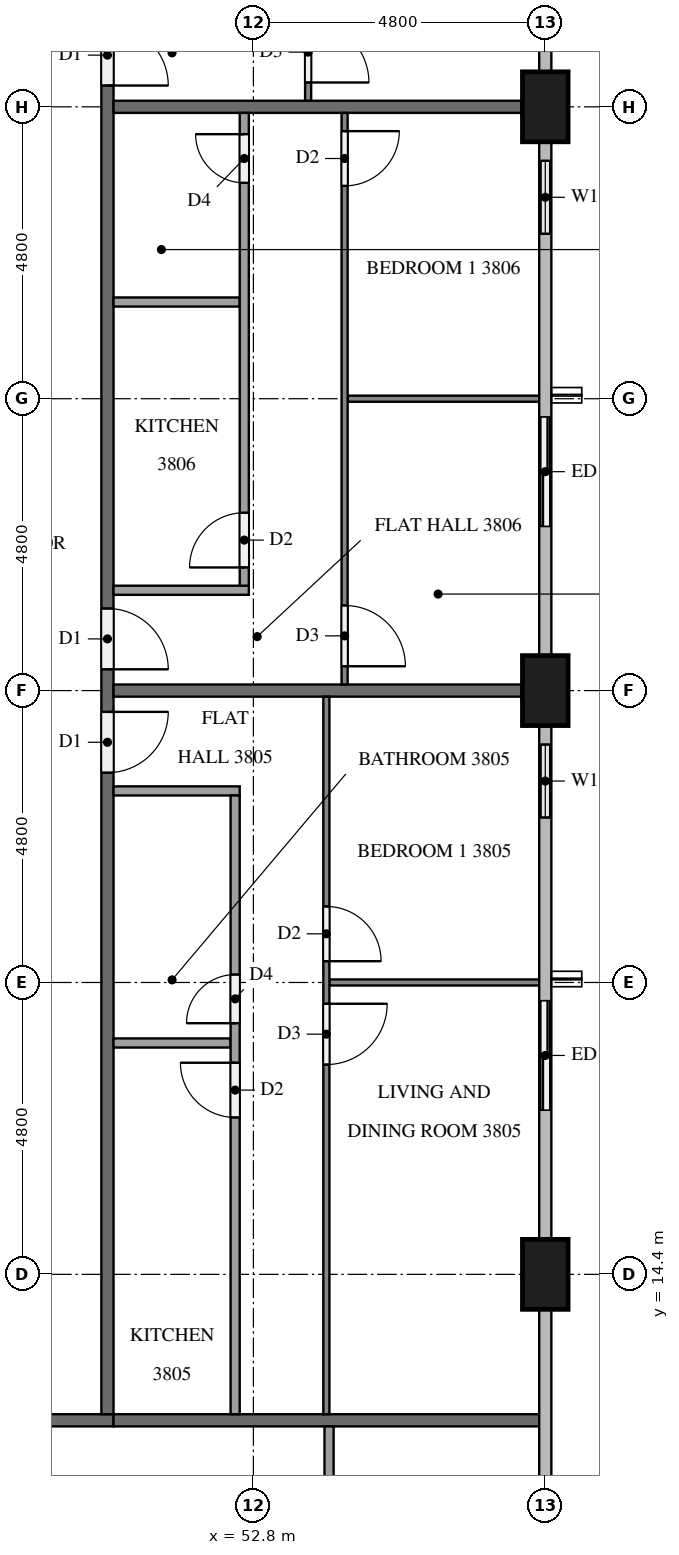
"""IFC4 building model, lengths in metres.
Left out: names, types, materials, properties, quantities, classifications, styles, units other than length and angle.
Written with IfcOpenShell. Run it as: python <this file> out.ifc"""

import sys

from ifc_helpers import new_model, si_unit, direction, frame, frame_2d, origin, origin_2d, place, context, subcontext, project, spatial, rectangle, extrude, element, fill, save


model = new_model("IFC4")
c1 = context("Model", 3, precision=1e-05, world=origin(), true_north=direction((0.0, 1.0)))
c2 = subcontext(c1, "Body", "Model", "MODEL_VIEW")
j1 = project(units=[si_unit("LENGTHUNIT", "METRE"), si_unit("PLANEANGLEUNIT", "RADIAN")], contexts=[c1])
p1 = place(None, origin())
s1 = spatial("IfcSite", under=j1, at=p1, CompositionType="ELEMENT")
p2 = place(p1, origin())
s2 = spatial("IfcBuilding", under=s1, at=p2, CompositionType="ELEMENT")
p3 = place(p2, frame((0.0, 0.0, 149.0)))
s3 = spatial("IfcBuildingStorey", under=s2, at=p3, CompositionType="ELEMENT", Elevation=149.0)
for number, where, z_axis, x_axis in (
    (1, (57.6, 14.4, 0.0), (0.0, 0.0, 1.0), (0.0, 1.0, 0.0)),
    (2, (57.6, 24.0, 0.0), (0.0, 0.0, 1.0), (0.0, 1.0, 0.0)),
    (3, (57.6, 33.6, 0.0), (0.0, 0.0, 1.0), (0.0, 1.0, 0.0)),
):
    element("IfcColumn", number, at=place(p3, frame(where, z_axis=z_axis, x_axis=x_axis)), inside=s3, PredefinedType="COLUMN", context=c2, shape_type="SweptSolid", body=[
        extrude(rectangle(XDim=1.15, YDim=0.75, at=origin_2d()), origin(), (0.0, 0.0, 1.0), 3.2),
    ])
p4 = place(p3, frame((57.6, 16.8, 0.0), z_axis=(0.0, 0.0, 1.0), x_axis=(0.0, 1.0, 0.0)))
e4 = element("IfcWall", 4, at=p4, inside=s3, PredefinedType="SOLIDWALL", context=c2, shape_type="SweptSolid", body=[
    extrude(rectangle(XDim=2.4, YDim=0.15, at=frame_2d((1.2, 0.0))), origin(), (0.0, 0.0, 1.0), 3.2),
])
p5 = place(p4, frame((0.3, 0.0, 0.0)))
e5 = element("IfcOpeningElement", 5, at=p5, cuts=e4, PredefinedType="OPENING", context=c2, shape_type="SweptSolid", body=[
    extrude(rectangle(XDim=1.8, YDim=2.4, at=frame_2d((0.9, 1.2))), frame((0.0, 0.085, 0.0), z_axis=(0.0, -1.0, 0.0), x_axis=(1.0, 0.0, 0.0)), (0.0, 0.0, 1.0), 0.17),
])
p6 = place(p3, frame((57.6, 21.6, 0.0), z_axis=(0.0, 0.0, 1.0), x_axis=(0.0, 1.0, 0.0)))
e6 = element("IfcWall", 6, at=p6, inside=s3, PredefinedType="SOLIDWALL", context=c2, shape_type="SweptSolid", body=[
    extrude(rectangle(XDim=1.825, YDim=0.15, at=frame_2d((0.913, 0.0))), origin(), (0.0, 0.0, 1.0), 3.2),
])
p7 = place(p6, frame((0.312, 0.0, 0.9)))
e7 = element("IfcOpeningElement", 7, at=p7, cuts=e6, PredefinedType="OPENING", context=c2, shape_type="SweptSolid", body=[
    extrude(rectangle(XDim=1.2, YDim=1.4, at=frame_2d((0.6, 0.7))), frame((0.0, 0.085, 0.0), z_axis=(0.0, -1.0, 0.0), x_axis=(1.0, 0.0, 0.0)), (0.0, 0.0, 1.0), 0.17),
])
p8 = place(p3, frame((57.6, 26.4, 0.0), z_axis=(0.0, 0.0, 1.0), x_axis=(0.0, 1.0, 0.0)))
e8 = element("IfcWall", 8, at=p8, inside=s3, PredefinedType="SOLIDWALL", context=c2, shape_type="SweptSolid", body=[
    extrude(rectangle(XDim=2.4, YDim=0.15, at=frame_2d((1.2, 0.0))), origin(), (0.0, 0.0, 1.0), 3.2),
])
p9 = place(p8, frame((0.3, 0.0, 0.0)))
e9 = element("IfcOpeningElement", 9, at=p9, cuts=e8, PredefinedType="OPENING", context=c2, shape_type="SweptSolid", body=[
    extrude(rectangle(XDim=1.8, YDim=2.4, at=frame_2d((0.9, 1.2))), frame((0.0, 0.085, 0.0), z_axis=(0.0, -1.0, 0.0), x_axis=(1.0, 0.0, 0.0)), (0.0, 0.0, 1.0), 0.17),
])
p10 = place(p3, frame((57.6, 31.2, 0.0), z_axis=(0.0, 0.0, 1.0), x_axis=(0.0, 1.0, 0.0)))
e10 = element("IfcWall", 10, at=p10, inside=s3, PredefinedType="SOLIDWALL", context=c2, shape_type="SweptSolid", body=[
    extrude(rectangle(XDim=1.825, YDim=0.15, at=frame_2d((0.913, 0.0))), origin(), (0.0, 0.0, 1.0), 3.2),
])
p11 = place(p10, frame((0.312, 0.0, 0.9)))
e11 = element("IfcOpeningElement", 11, at=p11, cuts=e10, PredefinedType="OPENING", context=c2, shape_type="SweptSolid", body=[
    extrude(rectangle(XDim=1.2, YDim=1.4, at=frame_2d((0.6, 0.7))), frame((0.0, 0.085, 0.0), z_axis=(0.0, -1.0, 0.0), x_axis=(1.0, 0.0, 0.0)), (0.0, 0.0, 1.0), 0.17),
])
p12 = place(p3, frame((50.5, 12.0, 0.0), z_axis=(0.0, 0.0, 1.0), x_axis=(-1.0, 0.0, 0.0)))
e12 = element("IfcWall", 12, at=p12, inside=s3, PredefinedType="PARTITIONING", context=c2, shape_type="SweptSolid", body=[
    extrude(rectangle(XDim=38.6, YDim=0.2, at=frame_2d((19.3, 0.0))), origin(), (0.0, 0.0, 1.0), 3.2),
])
p13 = place(p12, frame((36.45, 0.0, 0.0)))
e13 = element("IfcOpeningElement", 13, at=p13, cuts=e12, PredefinedType="OPENING", context=c2, shape_type="SweptSolid", body=[
    extrude(rectangle(XDim=1.0, YDim=2.1, at=frame_2d((0.5, 1.05))), frame((0.0, 0.11, 0.0), z_axis=(0.0, -1.0, 0.0), x_axis=(1.0, 0.0, 0.0)), (0.0, 0.0, 1.0), 0.22),
])
p14 = place(p12, frame((34.75, 0.0, 0.0)))
e14 = element("IfcOpeningElement", 14, at=p14, cuts=e12, PredefinedType="OPENING", context=c2, shape_type="SweptSolid", body=[
    extrude(rectangle(XDim=1.0, YDim=2.1, at=frame_2d((0.5, 1.05))), frame((0.0, 0.11, 0.0), z_axis=(0.0, -1.0, 0.0), x_axis=(1.0, 0.0, 0.0)), (0.0, 0.0, 1.0), 0.22),
])
p15 = place(p12, frame((10.05, 0.0, 0.0)))
e15 = element("IfcOpeningElement", 15, at=p15, cuts=e12, PredefinedType="OPENING", context=c2, shape_type="SweptSolid", body=[
    extrude(rectangle(XDim=1.0, YDim=2.1, at=frame_2d((0.5, 1.05))), frame((0.0, 0.11, 0.0), z_axis=(0.0, -1.0, 0.0), x_axis=(1.0, 0.0, 0.0)), (0.0, 0.0, 1.0), 0.22),
])
p16 = place(p12, frame((8.35, 0.0, 0.0)))
e16 = element("IfcOpeningElement", 16, at=p16, cuts=e12, PredefinedType="OPENING", context=c2, shape_type="SweptSolid", body=[
    extrude(rectangle(XDim=1.0, YDim=2.1, at=frame_2d((0.5, 1.05))), frame((0.0, 0.11, 0.0), z_axis=(0.0, -1.0, 0.0), x_axis=(1.0, 0.0, 0.0)), (0.0, 0.0, 1.0), 0.22),
])
p17 = place(p3, frame((50.4, 40.7, 0.0), z_axis=(0.0, 0.0, 1.0), x_axis=(0.0, -1.0, 0.0)))
e17 = element("IfcWall", 17, at=p17, inside=s3, PredefinedType="PARTITIONING", context=c2, shape_type="SweptSolid", body=[
    extrude(rectangle(XDim=28.6, YDim=0.2, at=frame_2d((14.3, 0.0))), origin(), (0.0, 0.0, 1.0), 3.2),
])
p18 = place(p17, frame((17.05, 0.0, 0.0)))
e18 = element("IfcOpeningElement", 18, at=p18, cuts=e17, PredefinedType="OPENING", context=c2, shape_type="SweptSolid", body=[
    extrude(rectangle(XDim=1.0, YDim=2.1, at=frame_2d((0.5, 1.05))), frame((0.0, 0.11, 0.0), z_axis=(0.0, -1.0, 0.0), x_axis=(1.0, 0.0, 0.0)), (0.0, 0.0, 1.0), 0.22),
])
p19 = place(p17, frame((15.35, 0.0, 0.0)))
e19 = element("IfcOpeningElement", 19, at=p19, cuts=e17, PredefinedType="OPENING", context=c2, shape_type="SweptSolid", body=[
    extrude(rectangle(XDim=1.0, YDim=2.1, at=frame_2d((0.5, 1.05))), frame((0.0, 0.11, 0.0), z_axis=(0.0, -1.0, 0.0), x_axis=(1.0, 0.0, 0.0)), (0.0, 0.0, 1.0), 0.22),
])
p20 = place(p17, frame((5.75, 0.0, 0.0)))
e20 = element("IfcOpeningElement", 20, at=p20, cuts=e17, PredefinedType="OPENING", context=c2, shape_type="SweptSolid", body=[
    extrude(rectangle(XDim=1.0, YDim=2.1, at=frame_2d((0.5, 1.05))), frame((0.0, 0.11, 0.0), z_axis=(0.0, -1.0, 0.0), x_axis=(1.0, 0.0, 0.0)), (0.0, 0.0, 1.0), 0.22),
])
p21 = place(p3, frame((50.5, 12.0, 0.0), z_axis=(0.0, 0.0, 1.0), x_axis=(1.0, 0.0, 0.0)))
e21 = element("IfcWall", 21, at=p21, inside=s3, PredefinedType="PARTITIONING", context=c2, shape_type="SweptSolid", body=[
    extrude(rectangle(XDim=7.0, YDim=0.2, at=frame_2d((3.5, 0.0))), origin(), (0.0, 0.0, 1.0), 3.2),
])
for number, where, z_axis, x_axis in (
    (22, (50.5, 24.0, 0.0), (0.0, 0.0, 1.0), (1.0, 0.0, 0.0)),
    (23, (50.5, 33.6, 0.0), (0.0, 0.0, 1.0), (1.0, 0.0, 0.0)),
):
    element("IfcWall", number, at=place(p3, frame(where, z_axis=z_axis, x_axis=x_axis)), inside=s3, PredefinedType="PARTITIONING", context=c2, shape_type="SweptSolid", body=[
        extrude(rectangle(XDim=6.725, YDim=0.2, at=frame_2d((3.363, 0.0))), origin(), (0.0, 0.0, 1.0), 3.2),
    ])
p22 = place(p3, frame((54.044, 11.9, 0.0), z_axis=(0.0, 0.0, 1.0), x_axis=(0.0, -1.0, 0.0)))
e24 = element("IfcWall", 24, at=p22, inside=s3, PredefinedType="PARTITIONING", context=c2, shape_type="SweptSolid", body=[
    extrude(rectangle(XDim=4.175, YDim=0.15, at=frame_2d((2.087, 0.0))), origin(), (0.0, 0.0, 1.0), 3.2),
])
p23 = place(p3, frame((54.05, 19.2, 0.0), z_axis=(0.0, 0.0, 1.0), x_axis=(1.0, 0.0, 0.0)))
e25 = element("IfcWall", 25, at=p23, inside=s3, PredefinedType="PARTITIONING", context=c2, shape_type="SweptSolid", body=[
    extrude(rectangle(XDim=3.45, YDim=0.1, at=frame_2d((1.725, 0.0))), origin(), (0.0, 0.0, 1.0), 3.2),
])
p24 = place(p3, frame((54.0, 23.9, 0.0), z_axis=(0.0, 0.0, 1.0), x_axis=(0.0, -1.0, 0.0)))
e26 = element("IfcWall", 26, at=p24, inside=s3, PredefinedType="PARTITIONING", context=c2, shape_type="SweptSolid", body=[
    extrude(rectangle(XDim=11.8, YDim=0.1, at=frame_2d((5.9, 0.0))), origin(), (0.0, 0.0, 1.0), 3.2),
])
p25 = place(p24, frame((3.45, 0.0, 0.0)))
e27 = element("IfcOpeningElement", 27, at=p25, cuts=e26, PredefinedType="OPENING", context=c2, shape_type="SweptSolid", body=[
    extrude(rectangle(XDim=0.9, YDim=2.1, at=frame_2d((0.45, 1.05))), frame((0.0, 0.06, 0.0), z_axis=(0.0, -1.0, 0.0), x_axis=(1.0, 0.0, 0.0)), (0.0, 0.0, 1.0), 0.12),
])
p26 = place(p24, frame((5.05, 0.0, 0.0)))
e28 = element("IfcOpeningElement", 28, at=p26, cuts=e26, PredefinedType="OPENING", context=c2, shape_type="SweptSolid", body=[
    extrude(rectangle(XDim=1.0, YDim=2.1, at=frame_2d((0.5, 1.05))), frame((0.0, 0.06, 0.0), z_axis=(0.0, -1.0, 0.0), x_axis=(1.0, 0.0, 0.0)), (0.0, 0.0, 1.0), 0.12),
])
p27 = place(p3, frame((50.5, 18.205, 0.0), z_axis=(0.0, 0.0, 1.0), x_axis=(1.0, 0.0, 0.0)))
e29 = element("IfcWall", 29, at=p27, inside=s3, PredefinedType="PARTITIONING", context=c2, shape_type="SweptSolid", body=[
    extrude(rectangle(XDim=1.925, YDim=0.15, at=frame_2d((0.962, 0.0))), origin(), (0.0, 0.0, 1.0), 3.2),
])
p28 = place(p3, frame((50.5, 22.35, 0.0), z_axis=(0.0, 0.0, 1.0), x_axis=(1.0, 0.0, 0.0)))
e30 = element("IfcWall", 30, at=p28, inside=s3, PredefinedType="PARTITIONING", context=c2, shape_type="SweptSolid", body=[
    extrude(rectangle(XDim=2.075, YDim=0.15, at=frame_2d((1.038, 0.0))), origin(), (0.0, 0.0, 1.0), 3.2),
])
p29 = place(p3, frame((52.5, 12.1, 0.0), z_axis=(0.0, 0.0, 1.0), x_axis=(0.0, 1.0, 0.0)))
e31 = element("IfcWall", 31, at=p29, inside=s3, PredefinedType="PARTITIONING", context=c2, shape_type="SweptSolid", body=[
    extrude(rectangle(XDim=10.175, YDim=0.15, at=frame_2d((5.087, 0.0))), origin(), (0.0, 0.0, 1.0), 3.2),
])
p30 = place(p29, frame((6.43, 0.0, 0.0)))
e32 = element("IfcOpeningElement", 32, at=p30, cuts=e31, PredefinedType="OPENING", context=c2, shape_type="SweptSolid", body=[
    extrude(rectangle(XDim=0.8, YDim=2.1, at=frame_2d((0.4, 1.05))), frame((0.0, 0.085, 0.0), z_axis=(0.0, -1.0, 0.0), x_axis=(1.0, 0.0, 0.0)), (0.0, 0.0, 1.0), 0.17),
])
p31 = place(p29, frame((4.88, 0.0, 0.0)))
e33 = element("IfcOpeningElement", 33, at=p31, cuts=e31, PredefinedType="OPENING", context=c2, shape_type="SweptSolid", body=[
    extrude(rectangle(XDim=0.9, YDim=2.1, at=frame_2d((0.45, 1.05))), frame((0.0, 0.085, 0.0), z_axis=(0.0, -1.0, 0.0), x_axis=(1.0, 0.0, 0.0)), (0.0, 0.0, 1.0), 0.17),
])
p32 = place(p3, frame((54.35, 28.8, 0.0), z_axis=(0.0, 0.0, 1.0), x_axis=(1.0, 0.0, 0.0)))
e34 = element("IfcWall", 34, at=p32, inside=s3, PredefinedType="PARTITIONING", context=c2, shape_type="SweptSolid", body=[
    extrude(rectangle(XDim=3.15, YDim=0.1, at=frame_2d((1.575, 0.0))), origin(), (0.0, 0.0, 1.0), 3.2),
])
p33 = place(p3, frame((54.3, 33.5, 0.0), z_axis=(0.0, 0.0, 1.0), x_axis=(0.0, -1.0, 0.0)))
e35 = element("IfcWall", 35, at=p33, inside=s3, PredefinedType="PARTITIONING", context=c2, shape_type="SweptSolid", body=[
    extrude(rectangle(XDim=9.4, YDim=0.1, at=frame_2d((4.7, 0.0))), origin(), (0.0, 0.0, 1.0), 3.2),
])
p34 = place(p33, frame((8.1, 0.0, 0.0)))
e36 = element("IfcOpeningElement", 36, at=p34, cuts=e35, PredefinedType="OPENING", context=c2, shape_type="SweptSolid", body=[
    extrude(rectangle(XDim=1.0, YDim=2.1, at=frame_2d((0.5, 1.05))), frame((0.0, 0.06, 0.0), z_axis=(0.0, -1.0, 0.0), x_axis=(1.0, 0.0, 0.0)), (0.0, 0.0, 1.0), 0.12),
])
p35 = place(p33, frame((0.3, 0.0, 0.0)))
e37 = element("IfcOpeningElement", 37, at=p35, cuts=e35, PredefinedType="OPENING", context=c2, shape_type="SweptSolid", body=[
    extrude(rectangle(XDim=0.9, YDim=2.1, at=frame_2d((0.45, 1.05))), frame((0.0, 0.06, 0.0), z_axis=(0.0, -1.0, 0.0), x_axis=(1.0, 0.0, 0.0)), (0.0, 0.0, 1.0), 0.12),
])
p36 = place(p3, frame((50.5, 30.39, 0.0), z_axis=(0.0, 0.0, 1.0), x_axis=(1.0, 0.0, 0.0)))
e38 = element("IfcWall", 38, at=p36, inside=s3, PredefinedType="PARTITIONING", context=c2, shape_type="SweptSolid", body=[
    extrude(rectangle(XDim=2.075, YDim=0.15, at=frame_2d((1.038, 0.0))), origin(), (0.0, 0.0, 1.0), 3.2),
])
p37 = place(p3, frame((50.5, 25.65, 0.0), z_axis=(0.0, 0.0, 1.0), x_axis=(1.0, 0.0, 0.0)))
e39 = element("IfcWall", 39, at=p37, inside=s3, PredefinedType="PARTITIONING", context=c2, shape_type="SweptSolid", body=[
    extrude(rectangle(XDim=2.225, YDim=0.15, at=frame_2d((1.113, 0.0))), origin(), (0.0, 0.0, 1.0), 3.2),
])
p38 = place(p3, frame((52.65, 25.725, 0.0), z_axis=(0.0, 0.0, 1.0), x_axis=(0.0, 1.0, 0.0)))
e40 = element("IfcWall", 40, at=p38, inside=s3, PredefinedType="PARTITIONING", context=c2, shape_type="SweptSolid", body=[
    extrude(rectangle(XDim=7.775, YDim=0.15, at=frame_2d((3.887, 0.0))), origin(), (0.0, 0.0, 1.0), 3.2),
])
p39 = place(p38, frame((0.3, 0.0, 0.0)))
e41 = element("IfcOpeningElement", 41, at=p39, cuts=e40, PredefinedType="OPENING", context=c2, shape_type="SweptSolid", body=[
    extrude(rectangle(XDim=0.9, YDim=2.1, at=frame_2d((0.45, 1.05))), frame((0.0, 0.085, 0.0), z_axis=(0.0, -1.0, 0.0), x_axis=(1.0, 0.0, 0.0)), (0.0, 0.0, 1.0), 0.17),
])
p40 = place(p38, frame((6.625, 0.0, 0.0)))
e42 = element("IfcOpeningElement", 42, at=p40, cuts=e40, PredefinedType="OPENING", context=c2, shape_type="SweptSolid", body=[
    extrude(rectangle(XDim=0.8, YDim=2.1, at=frame_2d((0.4, 1.05))), frame((0.0, 0.085, 0.0), z_axis=(0.0, -1.0, 0.0), x_axis=(1.0, 0.0, 0.0)), (0.0, 0.0, 1.0), 0.17),
])
p41 = place(p3, frame((53.7, 40.7, 0.0), z_axis=(0.0, 0.0, 1.0), x_axis=(0.0, -1.0, 0.0)))
e43 = element("IfcWall", 43, at=p41, inside=s3, PredefinedType="PARTITIONING", context=c2, shape_type="SweptSolid", body=[
    extrude(rectangle(XDim=7.0, YDim=0.1, at=frame_2d((3.5, 0.0))), origin(), (0.0, 0.0, 1.0), 3.2),
])
p42 = place(p41, frame((5.7, 0.0, 0.0)))
e44 = element("IfcOpeningElement", 44, at=p42, cuts=e43, PredefinedType="OPENING", context=c2, shape_type="SweptSolid", body=[
    extrude(rectangle(XDim=1.0, YDim=2.1, at=frame_2d((0.5, 1.05))), frame((0.0, 0.06, 0.0), z_axis=(0.0, -1.0, 0.0), x_axis=(1.0, 0.0, 0.0)), (0.0, 0.0, 1.0), 0.12),
])
p43 = place(p5, origin())
e45 = element("IfcDoor", 45, at=p43, inside=s3, OperationType="SLIDING_TO_LEFT", PredefinedType="DOOR", context=c2, shape_type="SweptSolid", body=[
    extrude(rectangle(XDim=1.8, YDim=2.4, at=frame_2d((0.9, 1.2))), frame((0.0, 0.025, 0.0), z_axis=(0.0, -1.0, 0.0), x_axis=(1.0, 0.0, 0.0)), (0.0, 0.0, 1.0), 0.05),
])
fill(e5, e45)
p44 = place(p7, origin())
e46 = element("IfcWindow", 46, at=p44, inside=s3, PartitioningType="SINGLE_PANEL", PredefinedType="WINDOW", context=c2, shape_type="SweptSolid", body=[
    extrude(rectangle(XDim=1.2, YDim=1.4, at=frame_2d((0.6, 0.7))), frame((0.0, 0.03, 0.0), z_axis=(0.0, -1.0, 0.0), x_axis=(1.0, 0.0, 0.0)), (0.0, 0.0, 1.0), 0.06),
])
fill(e7, e46)
p45 = place(p9, origin())
e47 = element("IfcDoor", 47, at=p45, inside=s3, OperationType="SLIDING_TO_RIGHT", PredefinedType="DOOR", context=c2, shape_type="SweptSolid", body=[
    extrude(rectangle(XDim=1.8, YDim=2.4, at=frame_2d((0.9, 1.2))), frame((0.0, 0.025, 0.0), z_axis=(0.0, -1.0, 0.0), x_axis=(1.0, 0.0, 0.0)), (0.0, 0.0, 1.0), 0.05),
])
fill(e9, e47)
p46 = place(p11, origin())
e48 = element("IfcWindow", 48, at=p46, inside=s3, PartitioningType="SINGLE_PANEL", PredefinedType="WINDOW", context=c2, shape_type="SweptSolid", body=[
    extrude(rectangle(XDim=1.2, YDim=1.4, at=frame_2d((0.6, 0.7))), frame((0.0, 0.03, 0.0), z_axis=(0.0, -1.0, 0.0), x_axis=(1.0, 0.0, 0.0)), (0.0, 0.0, 1.0), 0.06),
])
fill(e11, e48)
p47 = place(p18, origin())
e49 = element("IfcDoor", 49, at=p47, inside=s3, OperationType="SINGLE_SWING_LEFT", PredefinedType="DOOR", context=c2, shape_type="SweptSolid", body=[
    extrude(rectangle(XDim=1.0, YDim=2.1, at=frame_2d((0.5, 1.05))), frame((0.0, 0.025, 0.0), z_axis=(0.0, -1.0, 0.0), x_axis=(1.0, 0.0, 0.0)), (0.0, 0.0, 1.0), 0.05),
])
fill(e18, e49)
p48 = place(p19, origin())
e50 = element("IfcDoor", 50, at=p48, inside=s3, OperationType="SINGLE_SWING_RIGHT", PredefinedType="DOOR", context=c2, shape_type="SweptSolid", body=[
    extrude(rectangle(XDim=1.0, YDim=2.1, at=frame_2d((0.5, 1.05))), frame((0.0, 0.025, 0.0), z_axis=(0.0, -1.0, 0.0), x_axis=(1.0, 0.0, 0.0)), (0.0, 0.0, 1.0), 0.05),
])
fill(e19, e50)
p49 = place(p20, origin())
e51 = element("IfcDoor", 51, at=p49, inside=s3, OperationType="SINGLE_SWING_RIGHT", PredefinedType="DOOR", context=c2, shape_type="SweptSolid", body=[
    extrude(rectangle(XDim=1.0, YDim=2.1, at=frame_2d((0.5, 1.05))), frame((0.0, 0.025, 0.0), z_axis=(0.0, -1.0, 0.0), x_axis=(1.0, 0.0, 0.0)), (0.0, 0.0, 1.0), 0.05),
])
fill(e20, e51)
p50 = place(p25, origin())
e52 = element("IfcDoor", 52, at=p50, inside=s3, OperationType="SINGLE_SWING_RIGHT", PredefinedType="DOOR", context=c2, shape_type="SweptSolid", body=[
    extrude(rectangle(XDim=0.9, YDim=2.1, at=frame_2d((0.45, 1.05))), frame((0.0, 0.025, 0.0), z_axis=(0.0, -1.0, 0.0), x_axis=(1.0, 0.0, 0.0)), (0.0, 0.0, 1.0), 0.05),
])
fill(e27, e52)
p51 = place(p26, origin())
e53 = element("IfcDoor", 53, at=p51, inside=s3, OperationType="SINGLE_SWING_LEFT", PredefinedType="DOOR", context=c2, shape_type="SweptSolid", body=[
    extrude(rectangle(XDim=1.0, YDim=2.1, at=frame_2d((0.5, 1.05))), frame((0.0, 0.025, 0.0), z_axis=(0.0, -1.0, 0.0), x_axis=(1.0, 0.0, 0.0)), (0.0, 0.0, 1.0), 0.05),
])
fill(e28, e53)
p52 = place(p30, origin())
e54 = element("IfcDoor", 54, at=p52, inside=s3, OperationType="SINGLE_SWING_LEFT", PredefinedType="DOOR", context=c2, shape_type="SweptSolid", body=[
    extrude(rectangle(XDim=0.8, YDim=2.1, at=frame_2d((0.4, 1.05))), frame((0.0, 0.025, 0.0), z_axis=(0.0, -1.0, 0.0), x_axis=(1.0, 0.0, 0.0)), (0.0, 0.0, 1.0), 0.05),
])
fill(e32, e54)
p53 = place(p31, origin())
e55 = element("IfcDoor", 55, at=p53, inside=s3, OperationType="SINGLE_SWING_RIGHT", PredefinedType="DOOR", context=c2, shape_type="SweptSolid", body=[
    extrude(rectangle(XDim=0.9, YDim=2.1, at=frame_2d((0.45, 1.05))), frame((0.0, 0.025, 0.0), z_axis=(0.0, -1.0, 0.0), x_axis=(1.0, 0.0, 0.0)), (0.0, 0.0, 1.0), 0.05),
])
fill(e33, e55)
p54 = place(p34, origin())
e56 = element("IfcDoor", 56, at=p54, inside=s3, OperationType="SINGLE_SWING_RIGHT", PredefinedType="DOOR", context=c2, shape_type="SweptSolid", body=[
    extrude(rectangle(XDim=1.0, YDim=2.1, at=frame_2d((0.5, 1.05))), frame((0.0, 0.025, 0.0), z_axis=(0.0, -1.0, 0.0), x_axis=(1.0, 0.0, 0.0)), (0.0, 0.0, 1.0), 0.05),
])
fill(e36, e56)
p55 = place(p35, origin())
e57 = element("IfcDoor", 57, at=p55, inside=s3, OperationType="SINGLE_SWING_LEFT", PredefinedType="DOOR", context=c2, shape_type="SweptSolid", body=[
    extrude(rectangle(XDim=0.9, YDim=2.1, at=frame_2d((0.45, 1.05))), frame((0.0, 0.025, 0.0), z_axis=(0.0, -1.0, 0.0), x_axis=(1.0, 0.0, 0.0)), (0.0, 0.0, 1.0), 0.05),
])
fill(e37, e57)
p56 = place(p39, origin())
e58 = element("IfcDoor", 58, at=p56, inside=s3, OperationType="SINGLE_SWING_LEFT", PredefinedType="DOOR", context=c2, shape_type="SweptSolid", body=[
    extrude(rectangle(XDim=0.9, YDim=2.1, at=frame_2d((0.45, 1.05))), frame((0.0, 0.025, 0.0), z_axis=(0.0, -1.0, 0.0), x_axis=(1.0, 0.0, 0.0)), (0.0, 0.0, 1.0), 0.05),
])
fill(e41, e58)
p57 = place(p40, origin())
e59 = element("IfcDoor", 59, at=p57, inside=s3, OperationType="SINGLE_SWING_RIGHT", PredefinedType="DOOR", context=c2, shape_type="SweptSolid", body=[
    extrude(rectangle(XDim=0.8, YDim=2.1, at=frame_2d((0.4, 1.05))), frame((0.0, 0.025, 0.0), z_axis=(0.0, -1.0, 0.0), x_axis=(1.0, 0.0, 0.0)), (0.0, 0.0, 1.0), 0.05),
])
fill(e42, e59)
p58 = place(p42, origin())
e60 = element("IfcDoor", 60, at=p58, inside=s3, OperationType="SINGLE_SWING_RIGHT", PredefinedType="DOOR", context=c2, shape_type="SweptSolid", body=[
    extrude(rectangle(XDim=1.0, YDim=2.1, at=frame_2d((0.5, 1.05))), frame((0.0, 0.025, 0.0), z_axis=(0.0, -1.0, 0.0), x_axis=(1.0, 0.0, 0.0)), (0.0, 0.0, 1.0), 0.05),
])
fill(e44, e60)
save(model, sys.argv[1])
